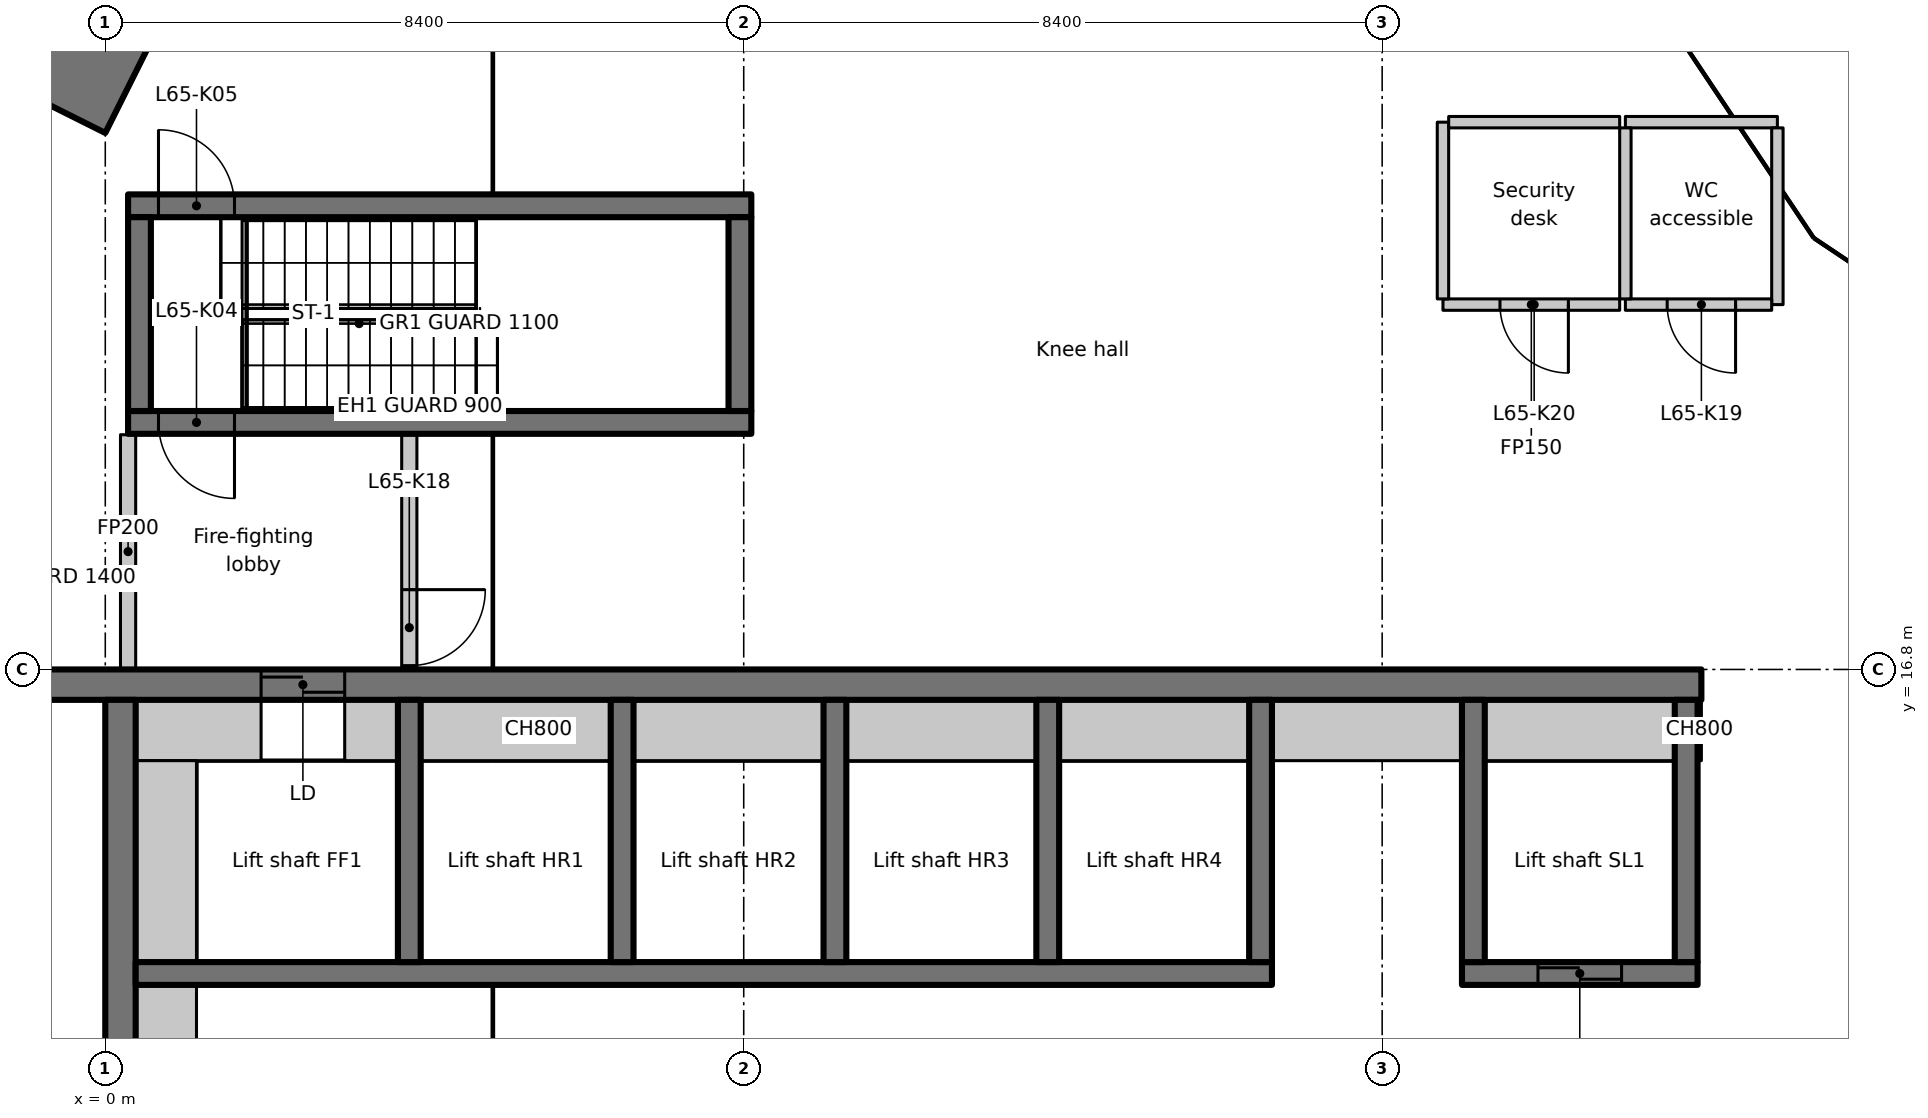
"""IFC4 building model, lengths in metres.
Left out: names, types, materials, properties, quantities, classifications, styles, units other than length and angle.
Written with IfcOpenShell. Run it as: python <this file> out.ifc"""

import sys

from ifc_helpers import new_model, si_unit, direction, frame, frame_2d, origin, place, context, subcontext, project, spatial, rectangle, extrude, element, fill, save


model = new_model("IFC4")
c1 = context("Model", 3, precision=1e-05, world=origin(), true_north=direction((0.0, 1.0)))
c2 = subcontext(c1, "Body", "Model", "MODEL_VIEW")
j1 = project(units=[si_unit("LENGTHUNIT", "METRE"), si_unit("PLANEANGLEUNIT", "RADIAN")], contexts=[c1])
p1 = place(None, origin())
s1 = spatial("IfcSite", under=j1, at=p1, CompositionType="ELEMENT")
p2 = place(p1, origin())
s2 = spatial("IfcBuilding", under=s1, at=p2, CompositionType="ELEMENT")
p3 = place(p2, frame((0.0, 0.0, 256.2)))
s3 = spatial("IfcBuildingStorey", under=s2, at=p3, CompositionType="ELEMENT", Elevation=256.2)
p4 = place(p3, frame((0.537, 26.273, 0.0), z_axis=(0.0, 0.0, 1.0), x_axis=(-0.4472135955, -0.894427191, 0.0)))
e1 = element("IfcWall", 1, at=p4, inside=s3, PredefinedType="SOLIDWALL", context=c2, shape_type="SweptSolid", body=[
    extrude(rectangle(XDim=2.4, YDim=1.2, at=frame_2d((1.2, 0.0))), origin(), (0.0, 0.0, 1.0), 8.0),
])
p5 = place(p3, frame((-1.1, 16.6, 0.0), z_axis=(0.0, 0.0, 1.0), x_axis=(1.0, 0.0, 0.0)))
e2 = element("IfcWall", 2, at=p5, inside=s3, PredefinedType="SHEAR", context=c2, shape_type="SweptSolid", body=[
    extrude(rectangle(XDim=22.1, YDim=0.4, at=frame_2d((11.05, 0.0))), origin(), (0.0, 0.0, 1.0), 7.7),
])
p6 = place(p5, frame((3.15, 0.0, 0.0)))
e3 = element("IfcOpeningElement", 3, at=p6, cuts=e2, PredefinedType="OPENING", context=c2, shape_type="SweptSolid", body=[
    extrude(rectangle(XDim=1.1, YDim=2.3, at=frame_2d((0.55, 1.15))), frame((0.0, 0.21, 0.0), z_axis=(0.0, -1.0, 0.0), x_axis=(1.0, 0.0, 0.0)), (0.0, 0.0, 1.0), 0.42),
])
p7 = place(p3, frame((0.2, 7.536, 0.0), z_axis=(0.0, 0.0, 1.0), x_axis=(0.0, 1.0, 0.0)))
e4 = element("IfcWall", 4, at=p7, inside=s3, PredefinedType="SHEAR", context=c2, shape_type="SweptSolid", body=[
    extrude(rectangle(XDim=8.864, YDim=0.4, at=frame_2d((4.432, 0.0))), origin(), (0.0, 0.0, 1.0), 7.7),
])
p8 = place(p3, frame((0.4, 16.0, 0.0), z_axis=(0.0, 0.0, 1.0), x_axis=(1.0, 0.0, 0.0)))
e5 = element("IfcWall", 5, at=p8, inside=s3, PredefinedType="PARTITIONING", context=c2, shape_type="SweptSolid", body=[
    extrude(rectangle(XDim=1.65, YDim=0.8, at=frame_2d((0.825, 0.0))), origin(), (0.0, 0.0, 1.0), 7.7),
])
p9 = place(p3, frame((0.4, 12.8, 0.0), z_axis=(0.0, 0.0, 1.0), x_axis=(1.0, 0.0, 0.0)))
e6 = element("IfcWall", 6, at=p9, inside=s3, PredefinedType="SHEAR", context=c2, shape_type="SweptSolid", body=[
    extrude(rectangle(XDim=14.95, YDim=0.3, at=frame_2d((7.475, 0.0))), origin(), (0.0, 0.0, 1.0), 7.7),
])
for number, where, z_axis, x_axis in (
    (7, (4.0, 12.95, 0.0), (0.0, 0.0, 1.0), (0.0, 1.0, 0.0)),
    (8, (6.8, 12.95, 0.0), (0.0, 0.0, 1.0), (0.0, 1.0, 0.0)),
    (9, (9.6, 12.95, 0.0), (0.0, 0.0, 1.0), (0.0, 1.0, 0.0)),
    (10, (12.4, 12.95, 0.0), (0.0, 0.0, 1.0), (0.0, 1.0, 0.0)),
    (11, (15.2, 12.95, 0.0), (0.0, 0.0, 1.0), (0.0, 1.0, 0.0)),
):
    element("IfcWall", number, at=place(p3, frame(where, z_axis=z_axis, x_axis=x_axis)), inside=s3, PredefinedType="SHEAR", context=c2, shape_type="SweptSolid", body=[
        extrude(rectangle(XDim=3.45, YDim=0.3, at=frame_2d((1.725, 0.0))), origin(), (0.0, 0.0, 1.0), 7.7),
    ])
p10 = place(p3, frame((17.85, 12.8, 0.0), z_axis=(0.0, 0.0, 1.0), x_axis=(1.0, 0.0, 0.0)))
e12 = element("IfcWall", 12, at=p10, inside=s3, PredefinedType="SHEAR", context=c2, shape_type="SweptSolid", body=[
    extrude(rectangle(XDim=3.1, YDim=0.3, at=frame_2d((1.55, 0.0))), origin(), (0.0, 0.0, 1.0), 7.7),
])
p11 = place(p10, frame((1.0, 0.0, 0.0)))
e13 = element("IfcOpeningElement", 13, at=p11, cuts=e12, PredefinedType="OPENING", context=c2, shape_type="SweptSolid", body=[
    extrude(rectangle(XDim=1.1, YDim=2.3, at=frame_2d((0.55, 1.15))), frame((0.0, 0.16, 0.0), z_axis=(0.0, -1.0, 0.0), x_axis=(1.0, 0.0, 0.0)), (0.0, 0.0, 1.0), 0.32),
])
for number, where, z_axis, x_axis in (
    (14, (18.0, 12.95, 0.0), (0.0, 0.0, 1.0), (0.0, 1.0, 0.0)),
    (15, (20.8, 12.95, 0.0), (0.0, 0.0, 1.0), (0.0, 1.0, 0.0)),
):
    element("IfcWall", number, at=place(p3, frame(where, z_axis=z_axis, x_axis=x_axis)), inside=s3, PredefinedType="SHEAR", context=c2, shape_type="SweptSolid", body=[
        extrude(rectangle(XDim=3.45, YDim=0.3, at=frame_2d((1.725, 0.0))), origin(), (0.0, 0.0, 1.0), 7.7),
    ])
p12 = place(p3, frame((8.5, 20.05, 0.0), z_axis=(0.0, 0.0, 1.0), x_axis=(-1.0, 0.0, 0.0)))
e16 = element("IfcWall", 16, at=p12, inside=s3, PredefinedType="SHEAR", context=c2, shape_type="SweptSolid", body=[
    extrude(rectangle(XDim=8.2, YDim=0.3, at=frame_2d((4.1, 0.0))), origin(), (0.0, 0.0, 1.0), 7.7),
])
p13 = place(p12, frame((6.8, 0.0, 0.0)))
e17 = element("IfcOpeningElement", 17, at=p13, cuts=e16, PredefinedType="OPENING", context=c2, shape_type="SweptSolid", body=[
    extrude(rectangle(XDim=1.0, YDim=2.1, at=frame_2d((0.5, 1.05))), frame((0.0, 0.16, 0.0), z_axis=(0.0, -1.0, 0.0), x_axis=(1.0, 0.0, 0.0)), (0.0, 0.0, 1.0), 0.32),
])
p14 = place(p3, frame((0.3, 22.9, 0.0), z_axis=(0.0, 0.0, 1.0), x_axis=(1.0, 0.0, 0.0)))
e18 = element("IfcWall", 18, at=p14, inside=s3, PredefinedType="SHEAR", context=c2, shape_type="SweptSolid", body=[
    extrude(rectangle(XDim=8.2, YDim=0.3, at=frame_2d((4.1, 0.0))), origin(), (0.0, 0.0, 1.0), 7.7),
])
p15 = place(p14, frame((0.4, 0.0, 0.0)))
e19 = element("IfcOpeningElement", 19, at=p15, cuts=e18, PredefinedType="OPENING", context=c2, shape_type="SweptSolid", body=[
    extrude(rectangle(XDim=1.0, YDim=2.1, at=frame_2d((0.5, 1.05))), frame((0.0, 0.16, 0.0), z_axis=(0.0, -1.0, 0.0), x_axis=(1.0, 0.0, 0.0)), (0.0, 0.0, 1.0), 0.32),
])
for number, where, z_axis, x_axis in (
    (20, (0.45, 20.2, 0.0), (0.0, 0.0, 1.0), (0.0, 1.0, 0.0)),
    (21, (8.35, 20.2, 0.0), (0.0, 0.0, 1.0), (0.0, 1.0, 0.0)),
):
    element("IfcWall", number, at=place(p3, frame(where, z_axis=z_axis, x_axis=x_axis)), inside=s3, PredefinedType="SHEAR", context=c2, shape_type="SweptSolid", body=[
        extrude(rectangle(XDim=2.55, YDim=0.3, at=frame_2d((1.275, 0.0))), origin(), (0.0, 0.0, 1.0), 7.7),
    ])
p16 = place(p3, frame((0.3, 16.812, 0.0), z_axis=(0.0, 0.0, 1.0), x_axis=(0.0, 1.0, 0.0)))
e22 = element("IfcWall", 22, at=p16, inside=s3, PredefinedType="PARTITIONING", context=c2, shape_type="SweptSolid", body=[
    extrude(rectangle(XDim=3.076, YDim=0.2, at=frame_2d((1.538, 0.0))), origin(), (0.0, 0.0, 1.0), 7.7),
])
p17 = place(p3, frame((4.0, 19.888, 0.0), z_axis=(0.0, 0.0, 1.0), x_axis=(0.0, -1.0, 0.0)))
e23 = element("IfcWall", 23, at=p17, inside=s3, PredefinedType="PARTITIONING", context=c2, shape_type="SweptSolid", body=[
    extrude(rectangle(XDim=3.076, YDim=0.2, at=frame_2d((1.538, 0.0))), origin(), (0.0, 0.0, 1.0), 7.7),
])
p18 = place(p17, frame((2.038, 0.0, 0.0)))
e24 = element("IfcOpeningElement", 24, at=p18, cuts=e23, PredefinedType="OPENING", context=c2, shape_type="SweptSolid", body=[
    extrude(rectangle(XDim=1.0, YDim=2.1, at=frame_2d((0.5, 1.05))), frame((0.0, 0.11, 0.0), z_axis=(0.0, -1.0, 0.0), x_axis=(1.0, 0.0, 0.0)), (0.0, 0.0, 1.0), 0.22),
])
p19 = place(p3, frame((20.0, 24.0, 0.0), z_axis=(0.0, 0.0, 1.0), x_axis=(1.0, 0.0, 0.0)))
e25 = element("IfcWall", 25, at=p19, inside=s3, PredefinedType="PARTITIONING", context=c2, shape_type="SweptSolid", body=[
    extrude(rectangle(XDim=2.0, YDim=0.15, at=frame_2d((1.0, 0.0))), origin(), (0.0, 0.0, 1.0), 7.7),
])
p20 = place(p3, frame((22.0, 23.925, 0.0), z_axis=(0.0, 0.0, 1.0), x_axis=(0.0, -1.0, 0.0)))
e26 = element("IfcWall", 26, at=p20, inside=s3, PredefinedType="PARTITIONING", context=c2, shape_type="SweptSolid", body=[
    extrude(rectangle(XDim=2.325, YDim=0.15, at=frame_2d((1.163, 0.0))), origin(), (0.0, 0.0, 1.0), 7.7),
])
p21 = place(p3, frame((21.925, 21.6, 0.0), z_axis=(0.0, 0.0, 1.0), x_axis=(-1.0, 0.0, 0.0)))
e27 = element("IfcWall", 27, at=p21, inside=s3, PredefinedType="PARTITIONING", context=c2, shape_type="SweptSolid", body=[
    extrude(rectangle(XDim=1.925, YDim=0.15, at=frame_2d((0.962, 0.0))), origin(), (0.0, 0.0, 1.0), 7.7),
])
p22 = place(p21, frame((0.475, 0.0, 0.0)))
e28 = element("IfcOpeningElement", 28, at=p22, cuts=e27, PredefinedType="OPENING", context=c2, shape_type="SweptSolid", body=[
    extrude(rectangle(XDim=0.9, YDim=2.1, at=frame_2d((0.45, 1.05))), frame((0.0, 0.085, 0.0), z_axis=(0.0, -1.0, 0.0), x_axis=(1.0, 0.0, 0.0)), (0.0, 0.0, 1.0), 0.17),
])
p23 = place(p3, frame((20.0, 21.675, 0.0), z_axis=(0.0, 0.0, 1.0), x_axis=(0.0, 1.0, 0.0)))
e29 = element("IfcWall", 29, at=p23, inside=s3, PredefinedType="PARTITIONING", context=c2, shape_type="SweptSolid", body=[
    extrude(rectangle(XDim=2.25, YDim=0.15, at=frame_2d((1.125, 0.0))), origin(), (0.0, 0.0, 1.0), 7.7),
])
p24 = place(p3, frame((19.925, 21.6, 0.0), z_axis=(0.0, 0.0, 1.0), x_axis=(-1.0, 0.0, 0.0)))
e30 = element("IfcWall", 30, at=p24, inside=s3, PredefinedType="PARTITIONING", context=c2, shape_type="SweptSolid", body=[
    extrude(rectangle(XDim=2.325, YDim=0.15, at=frame_2d((1.163, 0.0))), origin(), (0.0, 0.0, 1.0), 7.7),
])
p25 = place(p24, frame((0.675, 0.0, 0.0)))
e31 = element("IfcOpeningElement", 31, at=p25, cuts=e30, PredefinedType="OPENING", context=c2, shape_type="SweptSolid", body=[
    extrude(rectangle(XDim=0.9, YDim=2.1, at=frame_2d((0.45, 1.05))), frame((0.0, 0.085, 0.0), z_axis=(0.0, -1.0, 0.0), x_axis=(1.0, 0.0, 0.0)), (0.0, 0.0, 1.0), 0.17),
])
p26 = place(p3, frame((17.6, 21.675, 0.0), z_axis=(0.0, 0.0, 1.0), x_axis=(0.0, 1.0, 0.0)))
e32 = element("IfcWall", 32, at=p26, inside=s3, PredefinedType="PARTITIONING", context=c2, shape_type="SweptSolid", body=[
    extrude(rectangle(XDim=2.325, YDim=0.15, at=frame_2d((1.163, 0.0))), origin(), (0.0, 0.0, 1.0), 7.7),
])
p27 = place(p3, frame((17.675, 24.0, 0.0), z_axis=(0.0, 0.0, 1.0), x_axis=(1.0, 0.0, 0.0)))
e33 = element("IfcWall", 33, at=p27, inside=s3, PredefinedType="PARTITIONING", context=c2, shape_type="SweptSolid", body=[
    extrude(rectangle(XDim=2.25, YDim=0.15, at=frame_2d((1.125, 0.0))), origin(), (0.0, 0.0, 1.0), 7.7),
])
p28 = place(p3, frame((0.8, 7.536, 0.0), z_axis=(0.0, 0.0, 1.0), x_axis=(0.0, 1.0, 0.0)))
e34 = element("IfcWall", 34, at=p28, inside=s3, PredefinedType="PARTITIONING", context=c2, shape_type="SweptSolid", body=[
    extrude(rectangle(XDim=5.114, YDim=0.8, at=frame_2d((2.557, 0.0))), origin(), (0.0, 0.0, 1.0), 7.7),
])
p29 = place(p3, frame((0.8, 12.95, 0.0), z_axis=(0.0, 0.0, 1.0), x_axis=(0.0, 1.0, 0.0)))
e35 = element("IfcWall", 35, at=p29, inside=s3, PredefinedType="PARTITIONING", context=c2, shape_type="SweptSolid", body=[
    extrude(rectangle(XDim=2.65, YDim=0.8, at=frame_2d((1.325, 0.0))), origin(), (0.0, 0.0, 1.0), 7.7),
])
p30 = place(p3, frame((3.15, 16.0, 0.0), z_axis=(0.0, 0.0, 1.0), x_axis=(1.0, 0.0, 0.0)))
e36 = element("IfcWall", 36, at=p30, inside=s3, PredefinedType="PARTITIONING", context=c2, shape_type="SweptSolid", body=[
    extrude(rectangle(XDim=0.7, YDim=0.8, at=frame_2d((0.35, 0.0))), origin(), (0.0, 0.0, 1.0), 7.7),
])
for number, where, z_axis, x_axis in (
    (37, (4.15, 16.0, 0.0), (0.0, 0.0, 1.0), (1.0, 0.0, 0.0)),
    (38, (6.95, 16.0, 0.0), (0.0, 0.0, 1.0), (1.0, 0.0, 0.0)),
    (39, (9.75, 16.0, 0.0), (0.0, 0.0, 1.0), (1.0, 0.0, 0.0)),
    (40, (12.55, 16.0, 0.0), (0.0, 0.0, 1.0), (1.0, 0.0, 0.0)),
    (41, (15.35, 16.0, 0.0), (0.0, 0.0, 1.0), (1.0, 0.0, 0.0)),
    (42, (18.15, 16.0, 0.0), (0.0, 0.0, 1.0), (1.0, 0.0, 0.0)),
):
    element("IfcWall", number, at=place(p3, frame(where, z_axis=z_axis, x_axis=x_axis)), inside=s3, PredefinedType="PARTITIONING", context=c2, shape_type="SweptSolid", body=[
        extrude(rectangle(XDim=2.5, YDim=0.8, at=frame_2d((1.25, 0.0))), origin(), (0.0, 0.0, 1.0), 7.7),
    ])
p31 = place(p3, frame((20.95, 16.0, 0.0), z_axis=(0.0, 0.0, 1.0), x_axis=(1.0, 0.0, 0.0)))
e43 = element("IfcWall", 43, at=p31, inside=s3, PredefinedType="PARTITIONING", context=c2, shape_type="SweptSolid", body=[
    extrude(rectangle(XDim=0.05, YDim=0.8, at=frame_2d((0.025, 0.0))), origin(), (0.0, 0.0, 1.0), 7.7),
])
p32 = place(p6, origin())
e44 = element("IfcDoor", 44, at=p32, inside=s3, OperationType="SLIDING_TO_LEFT", PredefinedType="DOOR", context=c2, shape_type="SweptSolid", body=[
    extrude(rectangle(XDim=1.1, YDim=2.3, at=frame_2d((0.55, 1.15))), frame((0.0, 0.025, 0.0), z_axis=(0.0, -1.0, 0.0), x_axis=(1.0, 0.0, 0.0)), (0.0, 0.0, 1.0), 0.05),
])
fill(e3, e44)
p33 = place(p11, origin())
e45 = element("IfcDoor", 45, at=p33, inside=s3, OperationType="SLIDING_TO_LEFT", PredefinedType="DOOR", context=c2, shape_type="SweptSolid", body=[
    extrude(rectangle(XDim=1.1, YDim=2.3, at=frame_2d((0.55, 1.15))), frame((0.0, 0.025, 0.0), z_axis=(0.0, -1.0, 0.0), x_axis=(1.0, 0.0, 0.0)), (0.0, 0.0, 1.0), 0.05),
])
fill(e13, e45)
p34 = place(p13, origin())
e46 = element("IfcDoor", 46, at=p34, inside=s3, OperationType="SINGLE_SWING_LEFT", PredefinedType="DOOR", context=c2, shape_type="SweptSolid", body=[
    extrude(rectangle(XDim=1.0, YDim=2.1, at=frame_2d((0.5, 1.05))), frame((0.0, 0.025, 0.0), z_axis=(0.0, -1.0, 0.0), x_axis=(1.0, 0.0, 0.0)), (0.0, 0.0, 1.0), 0.05),
])
fill(e17, e46)
p35 = place(p15, origin())
e47 = element("IfcDoor", 47, at=p35, inside=s3, OperationType="SINGLE_SWING_RIGHT", PredefinedType="DOOR", context=c2, shape_type="SweptSolid", body=[
    extrude(rectangle(XDim=1.0, YDim=2.1, at=frame_2d((0.5, 1.05))), frame((0.0, 0.025, 0.0), z_axis=(0.0, -1.0, 0.0), x_axis=(1.0, 0.0, 0.0)), (0.0, 0.0, 1.0), 0.05),
])
fill(e19, e47)
p36 = place(p18, origin())
e48 = element("IfcDoor", 48, at=p36, inside=s3, OperationType="SINGLE_SWING_LEFT", PredefinedType="DOOR", context=c2, shape_type="SweptSolid", body=[
    extrude(rectangle(XDim=1.0, YDim=2.1, at=frame_2d((0.5, 1.05))), frame((0.0, 0.025, 0.0), z_axis=(0.0, -1.0, 0.0), x_axis=(1.0, 0.0, 0.0)), (0.0, 0.0, 1.0), 0.05),
])
fill(e24, e48)
p37 = place(p22, origin())
e49 = element("IfcDoor", 49, at=p37, inside=s3, OperationType="SINGLE_SWING_RIGHT", PredefinedType="DOOR", context=c2, shape_type="SweptSolid", body=[
    extrude(rectangle(XDim=0.9, YDim=2.1, at=frame_2d((0.45, 1.05))), frame((0.0, 0.025, 0.0), z_axis=(0.0, -1.0, 0.0), x_axis=(1.0, 0.0, 0.0)), (0.0, 0.0, 1.0), 0.05),
])
fill(e28, e49)
p38 = place(p25, origin())
e50 = element("IfcDoor", 50, at=p38, inside=s3, OperationType="SINGLE_SWING_LEFT", PredefinedType="DOOR", context=c2, shape_type="SweptSolid", body=[
    extrude(rectangle(XDim=0.9, YDim=2.1, at=frame_2d((0.45, 1.05))), frame((0.0, 0.025, 0.0), z_axis=(0.0, -1.0, 0.0), x_axis=(1.0, 0.0, 0.0)), (0.0, 0.0, 1.0), 0.05),
])
fill(e31, e50)
save(model, sys.argv[1])
